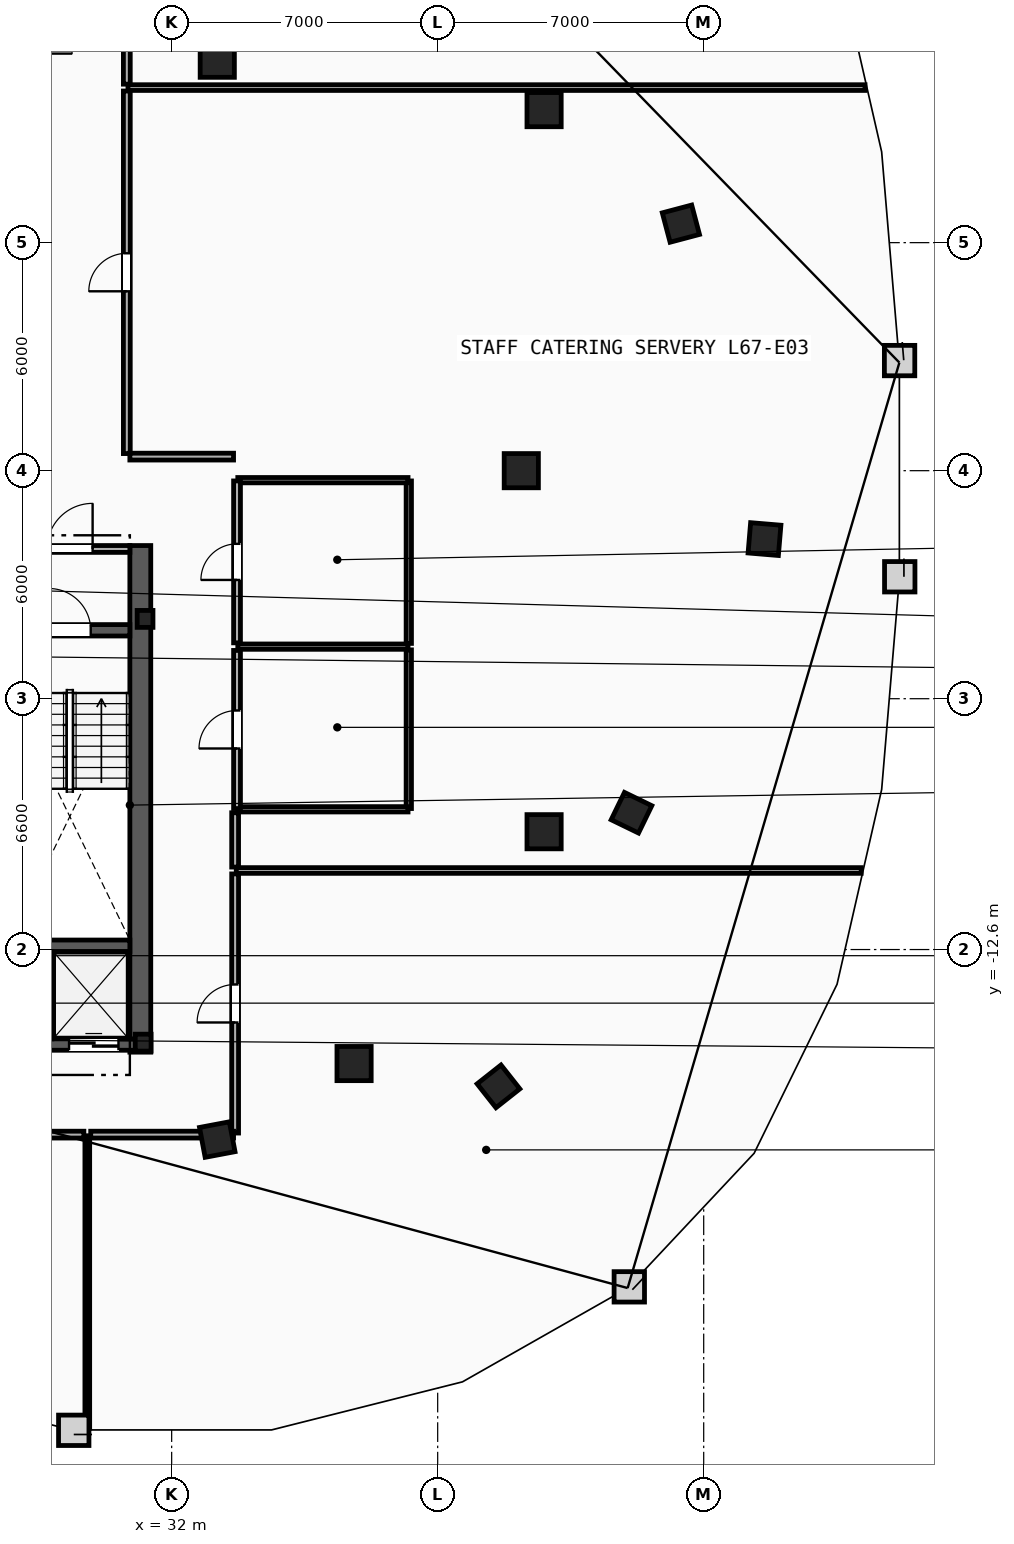
"""IFC4 building model, lengths in metres.
Left out: names, types, materials, properties, quantities, classifications, styles, units other than length and angle.
Written with IfcOpenShell. Run it as: python <this file> out.ifc"""

import sys

from ifc_helpers import new_model, si_unit, direction, frame, frame_2d, origin, origin_2d, place, context, subcontext, project, spatial, rectangle, i_section, extrude, element, fill, save


model = new_model("IFC4")
c1 = context("Model", 3, precision=1e-05, world=origin(), true_north=direction((0.0, 1.0)))
c2 = subcontext(c1, "Body", "Model", "MODEL_VIEW")
j1 = project(units=[si_unit("LENGTHUNIT", "METRE"), si_unit("PLANEANGLEUNIT", "RADIAN")], contexts=[c1])
p1 = place(None, origin())
s1 = spatial("IfcSite", under=j1, at=p1, CompositionType="ELEMENT")
p2 = place(p1, origin())
s2 = spatial("IfcBuilding", under=s1, at=p2, CompositionType="ELEMENT")
p3 = place(p2, frame((0.0, 0.0, 254.0)))
s3 = spatial("IfcBuildingStorey", under=s2, at=p3, CompositionType="ELEMENT", Elevation=254.0)
for number, where, z_axis, x_axis in (
    (1, (31.3, -3.9, 0.0), (0.0, 0.0, 1.0), (1.0, 0.0, 0.0)),
    (2, (31.25, -15.05, 0.0), (0.0, 0.0, 1.0), (1.0, 0.0, 0.0)),
):
    element("IfcColumn", number, at=place(p3, frame(where, z_axis=z_axis, x_axis=x_axis)), inside=s3, PredefinedType="COLUMN", context=c2, shape_type="SweptSolid", body=[
        extrude(i_section(OverallWidth=0.416, OverallDepth=0.446, WebThickness=0.039, FlangeThickness=0.063, FilletRadius=0.018, at=origin_2d()), origin(), (0.0, 0.0, 1.0), 3.6),
    ])
for number, where, z_axis, x_axis in (
    (3, (41.2, 0.0, 0.0), (0.0, 0.0, 1.0), (1.0, 0.0, 0.0)),
    (4, (41.8, -9.5, 0.0), (0.0, 0.0, 1.0), (1.0, 0.0, 0.0)),
    (5, (36.8, -15.6, 0.0), (0.0, 0.0, 1.0), (1.0, 0.0, 0.0)),
    (6, (41.8, 9.5, 0.0), (0.0, 0.0, 1.0), (1.0, 0.0, 0.0)),
    (7, (33.2, 10.8, 0.0), (0.0, 0.0, 1.0), (1.0, 0.0, 0.0)),
):
    element("IfcColumn", number, at=place(p3, frame(where, z_axis=z_axis, x_axis=x_axis)), inside=s3, PredefinedType="COLUMN", context=c2, shape_type="SweptSolid", body=[
        extrude(rectangle(XDim=0.9, YDim=0.9, at=origin_2d()), origin(), (0.0, 0.0, 1.0), 3.6),
    ])
for number, where, z_axis, x_axis in (
    (8, (33.2, -17.6, 0.0), (0.0, 0.0, 1.0), (0.983, 0.186, 0.0)),
    (9, (40.6, -16.2, 0.0), (0.0, 0.0, 1.0), (0.785, 0.619, 0.0)),
    (10, (44.1, -9.0, 0.0), (0.0, 0.0, 1.0), (0.437, 0.899, 0.0)),
    (11, (47.6, -1.8, 0.0), (0.0, 0.0, 1.0), (0.084, 0.997, 0.0)),
    (12, (45.4, 6.5, 0.0), (0.0, 0.0, 1.0), (-0.256, 0.967, 0.0)),
):
    element("IfcColumn", number, at=place(p3, frame(where, z_axis=z_axis, x_axis=x_axis)), inside=s3, PredefinedType="COLUMN", context=c2, shape_type="SweptSolid", body=[
        extrude(rectangle(XDim=0.8, YDim=0.8, at=origin_2d()), origin(), (0.0, 0.0, 1.0), 3.6),
    ])
p4 = place(p3, frame((31.175, -15.3, 0.0), z_axis=(0.0, 0.0, 1.0), x_axis=(0.0, 1.0, 0.0)))
e13 = element("IfcWall", 13, at=p4, inside=s3, PredefinedType="SHEAR", context=c2, shape_type="SweptSolid", body=[
    extrude(rectangle(XDim=13.33, YDim=0.55, at=frame_2d((6.665, 0.0))), origin(), (0.0, 0.0, 1.0), 3.34),
])
p5 = place(p3, frame((27.74, -4.2, 0.0), z_axis=(0.0, 0.0, 1.0), x_axis=(1.0, 0.0, 0.0)))
e14 = element("IfcWall", 14, at=p5, inside=s3, PredefinedType="SHEAR", context=c2, shape_type="SweptSolid", body=[
    extrude(rectangle(XDim=3.16, YDim=0.3, at=frame_2d((1.58, 0.0))), origin(), (0.0, 0.0, 1.0), 3.34),
])
p6 = place(p5, frame((1.03, 0.0, 0.0)))
e15 = element("IfcOpeningElement", 15, at=p6, cuts=e14, PredefinedType="OPENING", context=c2, shape_type="SweptSolid", body=[
    extrude(rectangle(XDim=1.1, YDim=2.15, at=frame_2d((0.55, 1.075))), frame((0.0, 0.16, 0.0), z_axis=(0.0, -1.0, 0.0), x_axis=(1.0, 0.0, 0.0)), (0.0, 0.0, 1.0), 0.32),
])
p7 = place(p3, frame((27.74, -12.5, 0.0), z_axis=(0.0, 0.0, 1.0), x_axis=(1.0, 0.0, 0.0)))
e16 = element("IfcWall", 16, at=p7, inside=s3, PredefinedType="SHEAR", context=c2, shape_type="SweptSolid", body=[
    extrude(rectangle(XDim=3.16, YDim=0.3, at=frame_2d((1.58, 0.0))), origin(), (0.0, 0.0, 1.0), 3.34),
])
p8 = place(p3, frame((27.74, -2.06, 0.0), z_axis=(0.0, 0.0, 1.0), x_axis=(1.0, 0.0, 0.0)))
e17 = element("IfcWall", 17, at=p8, inside=s3, PredefinedType="PARTITIONING", context=c2, shape_type="SweptSolid", body=[
    extrude(rectangle(XDim=3.16, YDim=0.18, at=frame_2d((1.58, 0.0))), origin(), (0.0, 0.0, 1.0), 3.34),
])
p9 = place(p8, frame((0.98, 0.0, 0.0)))
e18 = element("IfcOpeningElement", 18, at=p9, cuts=e17, PredefinedType="OPENING", context=c2, shape_type="SweptSolid", body=[
    extrude(rectangle(XDim=1.2, YDim=2.15, at=frame_2d((0.6, 1.075))), frame((0.0, 0.1, 0.0), z_axis=(0.0, -1.0, 0.0), x_axis=(1.0, 0.0, 0.0)), (0.0, 0.0, 1.0), 0.2),
])
p10 = place(p3, frame((28.7, -15.1, 0.0), z_axis=(0.0, 0.0, 1.0), x_axis=(1.0, 0.0, 0.0)))
e19 = element("IfcWall", 19, at=p10, inside=s3, PredefinedType="SHEAR", context=c2, shape_type="SweptSolid", body=[
    extrude(rectangle(XDim=2.5, YDim=0.3, at=frame_2d((1.25, 0.0))), origin(), (0.0, 0.0, 1.0), 3.34),
])
p11 = place(p10, frame((0.6, 0.0, 0.0)))
e20 = element("IfcOpeningElement", 20, at=p11, cuts=e19, PredefinedType="OPENING", context=c2, shape_type="SweptSolid", body=[
    extrude(rectangle(XDim=1.3, YDim=2.2, at=frame_2d((0.65, 1.1))), frame((0.0, 0.16, 0.0), z_axis=(0.0, -1.0, 0.0), x_axis=(1.0, 0.0, 0.0)), (0.0, 0.0, 1.0), 0.32),
])
p12 = place(p3, frame((38.24, -8.89, 0.0), z_axis=(0.0, 0.0, 1.0), x_axis=(0.0, 1.0, 0.0)))
e21 = element("IfcWall", 21, at=p12, inside=s3, PredefinedType="PARTITIONING", context=c2, shape_type="SweptSolid", body=[
    extrude(rectangle(XDim=4.175, YDim=0.14, at=frame_2d((2.087, 0.0))), origin(), (0.0, 0.0, 1.0), 3.34),
])
p13 = place(p3, frame((38.24, -4.545, 0.0), z_axis=(0.0, 0.0, 1.0), x_axis=(0.0, 1.0, 0.0)))
e22 = element("IfcWall", 22, at=p13, inside=s3, PredefinedType="PARTITIONING", context=c2, shape_type="SweptSolid", body=[
    extrude(rectangle(XDim=4.275, YDim=0.14, at=frame_2d((2.137, 0.0))), origin(), (0.0, 0.0, 1.0), 3.34),
])
for number, where, z_axis, x_axis in (
    (23, (33.74, -0.25, 0.0), (0.0, 0.0, 1.0), (1.0, 0.0, 0.0)),
    (24, (33.74, -4.63, 0.0), (0.0, 0.0, 1.0), (1.0, 0.0, 0.0)),
    (25, (33.74, -8.91, 0.0), (0.0, 0.0, 1.0), (1.0, 0.0, 0.0)),
):
    element("IfcWall", number, at=place(p3, frame(where, z_axis=z_axis, x_axis=x_axis)), inside=s3, PredefinedType="PARTITIONING", context=c2, shape_type="SweptSolid", body=[
        extrude(rectangle(XDim=4.48, YDim=0.14, at=frame_2d((2.24, 0.0))), origin(), (0.0, 0.0, 1.0), 3.34),
    ])
p14 = place(p3, frame((33.72, -4.53, 0.0), z_axis=(0.0, 0.0, 1.0), x_axis=(0.0, 1.0, 0.0)))
e26 = element("IfcWall", 26, at=p14, inside=s3, PredefinedType="PARTITIONING", context=c2, shape_type="SweptSolid", body=[
    extrude(rectangle(XDim=4.26, YDim=0.18, at=frame_2d((2.13, 0.0))), origin(), (0.0, 0.0, 1.0), 3.34),
])
p15 = place(p14, frame((1.655, 0.0, 0.0)))
e27 = element("IfcOpeningElement", 27, at=p15, cuts=e26, PredefinedType="OPENING", context=c2, shape_type="SweptSolid", body=[
    extrude(rectangle(XDim=0.95, YDim=2.1, at=frame_2d((0.475, 1.05))), frame((0.0, 0.1, 0.0), z_axis=(0.0, -1.0, 0.0), x_axis=(1.0, 0.0, 0.0)), (0.0, 0.0, 1.0), 0.2),
])
p16 = place(p3, frame((33.72, -8.89, 0.0), z_axis=(0.0, 0.0, 1.0), x_axis=(0.0, 1.0, 0.0)))
e28 = element("IfcWall", 28, at=p16, inside=s3, PredefinedType="PARTITIONING", context=c2, shape_type="SweptSolid", body=[
    extrude(rectangle(XDim=4.16, YDim=0.18, at=frame_2d((2.08, 0.0))), origin(), (0.0, 0.0, 1.0), 3.34),
])
p17 = place(p16, frame((1.58, 0.0, 0.0)))
e29 = element("IfcOpeningElement", 29, at=p17, cuts=e28, PredefinedType="OPENING", context=c2, shape_type="SweptSolid", body=[
    extrude(rectangle(XDim=1.0, YDim=2.15, at=frame_2d((0.5, 1.075))), frame((0.0, 0.1, 0.0), z_axis=(0.0, -1.0, 0.0), x_axis=(1.0, 0.0, 0.0)), (0.0, 0.0, 1.0), 0.2),
])
p18 = place(p3, frame((30.85, 10.08, 0.0), z_axis=(0.0, 0.0, 1.0), x_axis=(1.0, 0.0, 0.0)))
e30 = element("IfcWall", 30, at=p18, inside=s3, PredefinedType="PARTITIONING", context=c2, shape_type="SweptSolid", body=[
    extrude(rectangle(XDim=19.395, YDim=0.15, at=frame_2d((9.697, 0.0))), origin(), (0.0, 0.0, 1.0), 2.724),
])
p19 = place(p3, frame((33.7, -10.52, 0.0), z_axis=(0.0, 0.0, 1.0), x_axis=(1.0, 0.0, 0.0)))
e31 = element("IfcWall", 31, at=p19, inside=s3, PredefinedType="PARTITIONING", context=c2, shape_type="SweptSolid", body=[
    extrude(rectangle(XDim=16.444, YDim=0.15, at=frame_2d((8.222, 0.0))), origin(), (0.0, 0.0, 1.0), 3.34),
])
p20 = place(p3, frame((29.78, -25.19, 0.0), z_axis=(0.0, 0.0, 1.0), x_axis=(0.0, 1.0, 0.0)))
e32 = element("IfcWall", 32, at=p20, inside=s3, PredefinedType="PARTITIONING", context=c2, shape_type="SweptSolid", body=[
    extrude(rectangle(XDim=7.69, YDim=0.125, at=frame_2d((3.845, 0.0))), origin(), (0.0, 0.0, 1.0), 3.34),
])
p21 = place(p3, frame((33.67, -17.428, 0.0), z_axis=(0.0, 0.0, 1.0), x_axis=(0.0, 1.0, 0.0)))
e33 = element("IfcWall", 33, at=p21, inside=s3, PredefinedType="PARTITIONING", context=c2, shape_type="SweptSolid", body=[
    extrude(rectangle(XDim=6.818, YDim=0.18, at=frame_2d((3.409, 0.0))), origin(), (0.0, 0.0, 1.0), 3.34),
])
p22 = place(p21, frame((2.909, 0.0, 0.0)))
e34 = element("IfcOpeningElement", 34, at=p22, cuts=e33, PredefinedType="OPENING", context=c2, shape_type="SweptSolid", body=[
    extrude(rectangle(XDim=1.0, YDim=2.15, at=frame_2d((0.5, 1.075))), frame((0.0, 0.1, 0.0), z_axis=(0.0, -1.0, 0.0), x_axis=(1.0, 0.0, 0.0)), (0.0, 0.0, 1.0), 0.2),
])
p23 = place(p3, frame((29.87, -17.47, 0.0), z_axis=(0.0, 0.0, 1.0), x_axis=(1.0, 0.0, 0.0)))
e35 = element("IfcWall", 35, at=p23, inside=s3, PredefinedType="PARTITIONING", context=c2, shape_type="SweptSolid", body=[
    extrude(rectangle(XDim=3.758, YDim=0.18, at=frame_2d((1.879, 0.0))), origin(), (0.0, 0.0, 1.0), 3.34),
])
p24 = place(p3, frame((21.122, -17.47, 0.0), z_axis=(0.0, 0.0, 1.0), x_axis=(1.0, 0.0, 0.0)))
e36 = element("IfcWall", 36, at=p24, inside=s3, PredefinedType="PARTITIONING", context=c2, shape_type="SweptSolid", body=[
    extrude(rectangle(XDim=8.568, YDim=0.18, at=frame_2d((4.284, 0.0))), origin(), (0.0, 0.0, 1.0), 3.34),
])
p25 = place(p24, frame((2.685, 0.0, 0.0)))
e37 = element("IfcOpeningElement", 37, at=p25, cuts=e36, PredefinedType="OPENING", context=c2, shape_type="SweptSolid", body=[
    extrude(rectangle(XDim=1.0, YDim=2.15, at=frame_2d((0.5, 1.075))), frame((0.0, 0.1, 0.0), z_axis=(0.0, -1.0, 0.0), x_axis=(1.0, 0.0, 0.0)), (0.0, 0.0, 1.0), 0.2),
])
p26 = place(p3, frame((30.82, 0.45, 0.0), z_axis=(0.0, 0.0, 1.0), x_axis=(0.0, 1.0, 0.0)))
e38 = element("IfcWall", 38, at=p26, inside=s3, PredefinedType="PARTITIONING", context=c2, shape_type="SweptSolid", body=[
    extrude(rectangle(XDim=9.54, YDim=0.18, at=frame_2d((4.77, 0.0))), origin(), (0.0, 0.0, 1.0), 3.34),
])
p27 = place(p26, frame((4.27, 0.0, 0.0)))
e39 = element("IfcOpeningElement", 39, at=p27, cuts=e38, PredefinedType="OPENING", context=c2, shape_type="SweptSolid", body=[
    extrude(rectangle(XDim=1.0, YDim=2.15, at=frame_2d((0.5, 1.075))), frame((0.0, 0.1, 0.0), z_axis=(0.0, -1.0, 0.0), x_axis=(1.0, 0.0, 0.0)), (0.0, 0.0, 1.0), 0.2),
])
p28 = place(p3, frame((33.628, 0.37, 0.0), z_axis=(0.0, 0.0, 1.0), x_axis=(-1.0, 0.0, 0.0)))
e40 = element("IfcWall", 40, at=p28, inside=s3, PredefinedType="PARTITIONING", context=c2, shape_type="SweptSolid", body=[
    extrude(rectangle(XDim=2.729, YDim=0.18, at=frame_2d((1.364, 0.0))), origin(), (0.0, 0.0, 1.0), 3.34),
])
p29 = place(p3, frame((33.67, -10.43, 0.0), z_axis=(0.0, 0.0, 1.0), x_axis=(0.0, 1.0, 0.0)))
e41 = element("IfcWall", 41, at=p29, inside=s3, PredefinedType="PARTITIONING", context=c2, shape_type="SweptSolid", body=[
    extrude(rectangle(XDim=1.428, YDim=0.18, at=frame_2d((0.714, 0.0))), origin(), (0.0, 0.0, 1.0), 3.34),
])
p30 = place(p3, frame((30.82, 10.17, 0.0), z_axis=(0.0, 0.0, 1.0), x_axis=(0.0, 1.0, 0.0)))
e42 = element("IfcWall", 42, at=p30, inside=s3, PredefinedType="PARTITIONING", context=c2, shape_type="SweptSolid", body=[
    extrude(rectangle(XDim=2.609, YDim=0.18, at=frame_2d((1.304, 0.0))), origin(), (0.0, 0.0, 1.0), 3.34),
])
p31 = place(p6, origin())
e43 = element("IfcDoor", 43, at=p31, inside=s3, OperationType="SINGLE_SWING_LEFT", PredefinedType="DOOR", context=c2, shape_type="SweptSolid", body=[
    extrude(rectangle(XDim=1.1, YDim=2.15, at=frame_2d((0.55, 1.075))), frame((0.0, 0.025, 0.0), z_axis=(0.0, -1.0, 0.0), x_axis=(1.0, 0.0, 0.0)), (0.0, 0.0, 1.0), 0.05),
])
fill(e15, e43)
p32 = place(p9, origin())
e44 = element("IfcDoor", 44, at=p32, inside=s3, OperationType="SINGLE_SWING_RIGHT", PredefinedType="DOOR", context=c2, shape_type="SweptSolid", body=[
    extrude(rectangle(XDim=1.2, YDim=2.15, at=frame_2d((0.6, 1.075))), frame((0.0, 0.025, 0.0), z_axis=(0.0, -1.0, 0.0), x_axis=(1.0, 0.0, 0.0)), (0.0, 0.0, 1.0), 0.05),
])
fill(e18, e44)
p33 = place(p11, origin())
e45 = element("IfcDoor", 45, at=p33, inside=s3, OperationType="SLIDING_TO_LEFT", PredefinedType="TRAPDOOR", context=c2, shape_type="SweptSolid", body=[
    extrude(rectangle(XDim=1.3, YDim=2.2, at=frame_2d((0.65, 1.1))), frame((0.0, 0.025, 0.0), z_axis=(0.0, -1.0, 0.0), x_axis=(1.0, 0.0, 0.0)), (0.0, 0.0, 1.0), 0.05),
])
fill(e20, e45)
p34 = place(p27, origin())
e46 = element("IfcDoor", 46, at=p34, inside=s3, OperationType="SINGLE_SWING_LEFT", PredefinedType="DOOR", context=c2, shape_type="SweptSolid", body=[
    extrude(rectangle(XDim=1.0, YDim=2.15, at=frame_2d((0.5, 1.075))), frame((0.0, 0.025, 0.0), z_axis=(0.0, -1.0, 0.0), x_axis=(1.0, 0.0, 0.0)), (0.0, 0.0, 1.0), 0.05),
])
fill(e39, e46)
p35 = place(p22, origin())
e47 = element("IfcDoor", 47, at=p35, inside=s3, OperationType="SINGLE_SWING_LEFT", PredefinedType="DOOR", context=c2, shape_type="SweptSolid", body=[
    extrude(rectangle(XDim=1.0, YDim=2.15, at=frame_2d((0.5, 1.075))), frame((0.0, 0.025, 0.0), z_axis=(0.0, -1.0, 0.0), x_axis=(1.0, 0.0, 0.0)), (0.0, 0.0, 1.0), 0.05),
])
fill(e34, e47)
p36 = place(p15, origin())
e48 = element("IfcDoor", 48, at=p36, inside=s3, OperationType="SINGLE_SWING_LEFT", PredefinedType="DOOR", context=c2, shape_type="SweptSolid", body=[
    extrude(rectangle(XDim=0.95, YDim=2.1, at=frame_2d((0.475, 1.05))), frame((0.0, 0.025, 0.0), z_axis=(0.0, -1.0, 0.0), x_axis=(1.0, 0.0, 0.0)), (0.0, 0.0, 1.0), 0.05),
])
fill(e27, e48)
p37 = place(p17, origin())
e49 = element("IfcDoor", 49, at=p37, inside=s3, OperationType="SINGLE_SWING_LEFT", PredefinedType="DOOR", context=c2, shape_type="SweptSolid", body=[
    extrude(rectangle(XDim=1.0, YDim=2.15, at=frame_2d((0.5, 1.075))), frame((0.0, 0.025, 0.0), z_axis=(0.0, -1.0, 0.0), x_axis=(1.0, 0.0, 0.0)), (0.0, 0.0, 1.0), 0.05),
])
fill(e29, e49)
save(model, sys.argv[1])
